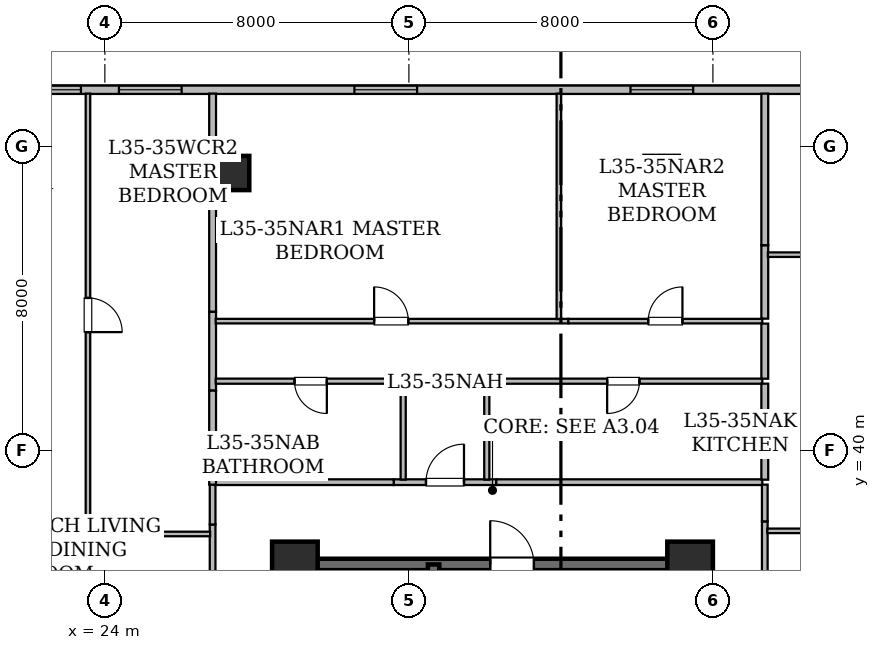
"""IFC4 building model, lengths in metres.
Left out: names, types, materials, properties, quantities, classifications, styles, units other than length and angle.
Written with IfcOpenShell. Run it as: python <this file> out.ifc"""

import sys

from ifc_helpers import new_model, si_unit, direction, frame, frame_2d, origin, origin_2d, place, context, subcontext, project, spatial, rectangle, hollow_rectangle, extrude, element, fill, save


model = new_model("IFC4")
c1 = context("Model", 3, precision=1e-05, world=origin(), true_north=direction((0.0, 1.0)))
c2 = subcontext(c1, "Body", "Model", "MODEL_VIEW")
j1 = project(units=[si_unit("LENGTHUNIT", "METRE"), si_unit("PLANEANGLEUNIT", "RADIAN")], contexts=[c1])
p1 = place(None, origin())
s1 = spatial("IfcSite", under=j1, at=p1, CompositionType="ELEMENT")
p2 = place(p1, origin())
s2 = spatial("IfcBuilding", under=s1, at=p2, CompositionType="ELEMENT")
p3 = place(p2, frame((0.0, 0.0, 138.4)))
s3 = spatial("IfcBuildingStorey", under=s2, at=p3, CompositionType="ELEMENT", Elevation=138.4)
for number, where, z_axis, x_axis in (
    (1, (29.0, 37.0, 0.0), (0.0, 0.0, 1.0), (1.0, 0.0, 0.0)),
    (2, (39.4, 37.0, 0.0), (0.0, 0.0, 1.0), (1.0, 0.0, 0.0)),
):
    element("IfcColumn", number, at=place(p3, frame(where, z_axis=z_axis, x_axis=x_axis)), inside=s3, PredefinedType="COLUMN", context=c2, shape_type="SweptSolid", body=[
        extrude(hollow_rectangle(XDim=1.2, YDim=1.2, WallThickness=0.06, at=origin_2d()), origin(), (0.0, 0.0, 1.0), 3.65),
    ])
for number, where, z_axis, x_axis in (
    (3, (27.35, 47.3, 0.0), (0.0, 0.0, 1.0), (1.0, 0.0, 0.0)),
    (4, (38.65, 47.3, 0.0), (0.0, 0.0, 1.0), (1.0, 0.0, 0.0)),
):
    element("IfcColumn", number, at=place(p3, frame(where, z_axis=z_axis, x_axis=x_axis)), inside=s3, PredefinedType="COLUMN", context=c2, shape_type="SweptSolid", body=[
        extrude(hollow_rectangle(XDim=0.9, YDim=0.9, WallThickness=0.045, at=origin_2d()), origin(), (0.0, 0.0, 1.0), 3.65),
    ])
p4 = place(p3, frame((13.715, 49.49, 0.0), z_axis=(0.0, 0.0, 1.0), x_axis=(1.0, 0.0, 0.0)))
e5 = element("IfcWall", 5, at=p4, inside=s3, PredefinedType="STANDARD", context=c2, shape_type="SweptSolid", body=[
    extrude(rectangle(XDim=38.639, YDim=0.22, at=frame_2d((19.319, 0.0))), origin(), (0.0, 0.0, 1.0), 3.43),
])
p5 = place(p4, frame((2.243, 0.0, 0.85)))
e6 = element("IfcOpeningElement", 6, at=p5, cuts=e5, PredefinedType="OPENING", context=c2, shape_type="SweptSolid", body=[
    extrude(rectangle(XDim=1.65, YDim=1.55, at=frame_2d((0.825, 0.775))), frame((0.0, 0.12, 0.0), z_axis=(0.0, -1.0, 0.0), x_axis=(1.0, 0.0, 0.0)), (0.0, 0.0, 1.0), 0.24),
])
p6 = place(p4, frame((8.455, 0.0, 0.8)))
e7 = element("IfcOpeningElement", 7, at=p6, cuts=e5, PredefinedType="OPENING", context=c2, shape_type="SweptSolid", body=[
    extrude(rectangle(XDim=1.2, YDim=1.5, at=frame_2d((0.6, 0.75))), frame((0.0, 0.12, 0.0), z_axis=(0.0, -1.0, 0.0), x_axis=(1.0, 0.0, 0.0)), (0.0, 0.0, 1.0), 0.24),
])
p7 = place(p4, frame((5.805, 0.0, 0.85)))
e8 = element("IfcOpeningElement", 8, at=p7, cuts=e5, PredefinedType="OPENING", context=c2, shape_type="SweptSolid", body=[
    extrude(rectangle(XDim=1.65, YDim=1.55, at=frame_2d((0.825, 0.775))), frame((0.0, 0.12, 0.0), z_axis=(0.0, -1.0, 0.0), x_axis=(1.0, 0.0, 0.0)), (0.0, 0.0, 1.0), 0.24),
])
p8 = place(p4, frame((10.655, 0.0, 0.85)))
e9 = element("IfcOpeningElement", 9, at=p8, cuts=e5, PredefinedType="OPENING", context=c2, shape_type="SweptSolid", body=[
    extrude(rectangle(XDim=1.65, YDim=1.55, at=frame_2d((0.825, 0.775))), frame((0.0, 0.12, 0.0), z_axis=(0.0, -1.0, 0.0), x_axis=(1.0, 0.0, 0.0)), (0.0, 0.0, 1.0), 0.24),
])
p9 = place(p4, frame((16.851, 0.0, 0.85)))
e10 = element("IfcOpeningElement", 10, at=p9, cuts=e5, PredefinedType="OPENING", context=c2, shape_type="SweptSolid", body=[
    extrude(rectangle(XDim=1.65, YDim=1.55, at=frame_2d((0.825, 0.775))), frame((0.0, 0.12, 0.0), z_axis=(0.0, -1.0, 0.0), x_axis=(1.0, 0.0, 0.0)), (0.0, 0.0, 1.0), 0.24),
])
p10 = place(p4, frame((24.116, 0.0, 0.85)))
e11 = element("IfcOpeningElement", 11, at=p10, cuts=e5, PredefinedType="OPENING", context=c2, shape_type="SweptSolid", body=[
    extrude(rectangle(XDim=1.65, YDim=1.55, at=frame_2d((0.825, 0.775))), frame((0.0, 0.12, 0.0), z_axis=(0.0, -1.0, 0.0), x_axis=(1.0, 0.0, 0.0)), (0.0, 0.0, 1.0), 0.24),
])
p11 = place(p4, frame((30.23, 0.0, 0.85)))
e12 = element("IfcOpeningElement", 12, at=p11, cuts=e5, PredefinedType="OPENING", context=c2, shape_type="SweptSolid", body=[
    extrude(rectangle(XDim=1.65, YDim=1.55, at=frame_2d((0.825, 0.775))), frame((0.0, 0.12, 0.0), z_axis=(0.0, -1.0, 0.0), x_axis=(1.0, 0.0, 0.0)), (0.0, 0.0, 1.0), 0.24),
])
p12 = place(p4, frame((36.367, 0.0, 0.85)))
e13 = element("IfcOpeningElement", 13, at=p12, cuts=e5, PredefinedType="OPENING", context=c2, shape_type="SweptSolid", body=[
    extrude(rectangle(XDim=1.65, YDim=1.55, at=frame_2d((0.825, 0.775))), frame((0.0, 0.12, 0.0), z_axis=(0.0, -1.0, 0.0), x_axis=(1.0, 0.0, 0.0)), (0.0, 0.0, 1.0), 0.24),
])
p13 = place(p3, frame((29.0, 28.0, 0.0), z_axis=(0.0, 0.0, 1.0), x_axis=(0.0, 1.0, 0.0)))
e14 = element("IfcWall", 14, at=p13, inside=s3, PredefinedType="SHEAR", context=c2, shape_type="SweptSolid", body=[
    extrude(rectangle(XDim=9.0, YDim=0.3, at=frame_2d((4.5, 0.0))), origin(), (0.0, 0.0, 1.0), 3.43),
])
p14 = place(p3, frame((29.0, 37.0, 0.0), z_axis=(0.0, 0.0, 1.0), x_axis=(1.0, 0.0, 0.0)))
e15 = element("IfcWall", 15, at=p14, inside=s3, PredefinedType="SHEAR", context=c2, shape_type="SweptSolid", body=[
    extrude(rectangle(XDim=10.4, YDim=0.3, at=frame_2d((5.2, 0.0))), origin(), (0.0, 0.0, 1.0), 3.43),
])
p15 = place(p14, frame((5.14, 0.0, 0.0)))
e16 = element("IfcOpeningElement", 16, at=p15, cuts=e15, PredefinedType="OPENING", context=c2, shape_type="SweptSolid", body=[
    extrude(rectangle(XDim=1.15, YDim=2.2, at=frame_2d((0.575, 1.1))), frame((0.0, 0.16, 0.0), z_axis=(0.0, -1.0, 0.0), x_axis=(1.0, 0.0, 0.0)), (0.0, 0.0, 1.0), 0.32),
])
p16 = place(p3, frame((39.4, 24.4, 0.0), z_axis=(0.0, 0.0, 1.0), x_axis=(0.0, 1.0, 0.0)))
e17 = element("IfcWall", 17, at=p16, inside=s3, PredefinedType="SHEAR", context=c2, shape_type="SweptSolid", body=[
    extrude(rectangle(XDim=12.6, YDim=0.3, at=frame_2d((6.3, 0.0))), origin(), (0.0, 0.0, 1.0), 3.43),
])
p17 = place(p3, frame((32.65, 28.0, 0.0), z_axis=(0.0, 0.0, 1.0), x_axis=(0.0, 1.0, 0.0)))
e18 = element("IfcWall", 18, at=p17, inside=s3, PredefinedType="SHEAR", context=c2, shape_type="SweptSolid", body=[
    extrude(rectangle(XDim=9.0, YDim=0.3, at=frame_2d((4.5, 0.0))), origin(), (0.0, 0.0, 1.0), 3.43),
])
p18 = place(p17, frame((0.72, 0.0, 0.0)))
e19 = element("IfcOpeningElement", 19, at=p18, cuts=e18, PredefinedType="OPENING", context=c2, shape_type="SweptSolid", body=[
    extrude(rectangle(XDim=1.0, YDim=2.15, at=frame_2d((0.5, 1.075))), frame((0.0, 0.16, 0.0), z_axis=(0.0, -1.0, 0.0), x_axis=(1.0, 0.0, 0.0)), (0.0, 0.0, 1.0), 0.32),
])
p19 = place(p3, frame((26.835, 35.973, 0.0), z_axis=(0.0, 0.0, 1.0), x_axis=(0.0, 1.0, 0.0)))
e20 = element("IfcWall", 20, at=p19, inside=s3, PredefinedType="STANDARD", context=c2, shape_type="SweptSolid", body=[
    extrude(rectangle(XDim=2.078, YDim=0.15, at=frame_2d((1.039, 0.0))), origin(), (0.0, 0.0, 1.0), 2.647),
])
p20 = place(p3, frame((26.835, 38.051, 0.0), z_axis=(0.0, 0.0, 1.0), x_axis=(0.0, 1.0, 0.0)))
e21 = element("IfcWall", 21, at=p20, inside=s3, PredefinedType="STANDARD", context=c2, shape_type="SweptSolid", body=[
    extrude(rectangle(XDim=1.049, YDim=0.15, at=frame_2d((0.524, 0.0))), origin(), (0.0, 0.0, 1.0), 3.43),
])
p21 = place(p3, frame((31.601, 39.165, 0.0), z_axis=(0.0, 0.0, 1.0), x_axis=(1.0, 0.0, 0.0)))
e22 = element("IfcWall", 22, at=p21, inside=s3, PredefinedType="STANDARD", context=c2, shape_type="SweptSolid", body=[
    extrude(rectangle(XDim=2.698, YDim=0.15, at=frame_2d((1.349, 0.0))), origin(), (0.0, 0.0, 1.0), 3.43),
])
p22 = place(p21, frame((0.849, 0.0, 0.0)))
e23 = element("IfcOpeningElement", 23, at=p22, cuts=e22, PredefinedType="OPENING", context=c2, shape_type="SweptSolid", body=[
    extrude(rectangle(XDim=1.0, YDim=2.15, at=frame_2d((0.5, 1.075))), frame((0.0, 0.085, 0.0), z_axis=(0.0, -1.0, 0.0), x_axis=(1.0, 0.0, 0.0)), (0.0, 0.0, 1.0), 0.17),
])
p23 = place(p3, frame((26.9, 39.165, 0.0), z_axis=(0.0, 0.0, 1.0), x_axis=(1.0, 0.0, 0.0)))
e24 = element("IfcWall", 24, at=p23, inside=s3, PredefinedType="STANDARD", context=c2, shape_type="SweptSolid", body=[
    extrude(rectangle(XDim=4.701, YDim=0.15, at=frame_2d((2.351, 0.0))), origin(), (0.0, 0.0, 1.0), 2.647),
])
p24 = place(p3, frame((34.299, 39.165, 0.0), z_axis=(0.0, 0.0, 1.0), x_axis=(1.0, 0.0, 0.0)))
e25 = element("IfcWall", 25, at=p24, inside=s3, PredefinedType="STANDARD", context=c2, shape_type="SweptSolid", body=[
    extrude(rectangle(XDim=7.001, YDim=0.15, at=frame_2d((3.5, 0.0))), origin(), (0.0, 0.0, 1.0), 2.647),
])
p25 = place(p3, frame((41.365, 38.133, 0.0), z_axis=(0.0, 0.0, 1.0), x_axis=(0.0, -1.0, 0.0)))
e26 = element("IfcWall", 26, at=p25, inside=s3, PredefinedType="STANDARD", context=c2, shape_type="SweptSolid", body=[
    extrude(rectangle(XDim=2.078, YDim=0.15, at=frame_2d((1.039, 0.0))), origin(), (0.0, 0.0, 1.0), 2.647),
])
p26 = place(p3, frame((41.365, 39.1, 0.0), z_axis=(0.0, 0.0, 1.0), x_axis=(0.0, -1.0, 0.0)))
e27 = element("IfcWall", 27, at=p26, inside=s3, PredefinedType="STANDARD", context=c2, shape_type="SweptSolid", body=[
    extrude(rectangle(XDim=0.967, YDim=0.15, at=frame_2d((0.483, 0.0))), origin(), (0.0, 0.0, 1.0), 3.43),
])
p27 = place(p3, frame((23.555, 49.388, 0.0), z_axis=(0.0, 0.0, 1.0), x_axis=(0.0, -1.0, 0.0)))
e28 = element("IfcWall", 28, at=p27, inside=s3, PredefinedType="PARTITIONING", context=c2, shape_type="SweptSolid", body=[
    extrude(rectangle(XDim=11.651, YDim=0.12, at=frame_2d((5.825, 0.0))), origin(), (0.0, 0.0, 1.0), 2.647),
])
p28 = place(p27, frame((5.375, 0.0, 0.0)))
e29 = element("IfcOpeningElement", 29, at=p28, cuts=e28, PredefinedType="OPENING", context=c2, shape_type="SweptSolid", body=[
    extrude(rectangle(XDim=0.9, YDim=2.1, at=frame_2d((0.45, 1.05))), frame((0.0, 0.07, 0.0), z_axis=(0.0, -1.0, 0.0), x_axis=(1.0, 0.0, 0.0)), (0.0, 0.0, 1.0), 0.14),
])
p29 = place(p3, frame((23.49, 37.802, 0.0), z_axis=(0.0, 0.0, 1.0), x_axis=(1.0, 0.0, 0.0)))
e30 = element("IfcWall", 30, at=p29, inside=s3, PredefinedType="PARTITIONING", context=c2, shape_type="SweptSolid", body=[
    extrude(rectangle(XDim=3.28, YDim=0.12, at=frame_2d((1.64, 0.0))), origin(), (0.0, 0.0, 1.0), 2.647),
])
p30 = place(p3, frame((26.835, 43.651, 0.0), z_axis=(0.0, 0.0, 1.0), x_axis=(0.0, -1.0, 0.0)))
e31 = element("IfcWall", 31, at=p30, inside=s3, PredefinedType="STANDARD", context=c2, shape_type="SweptSolid", body=[
    extrude(rectangle(XDim=2.078, YDim=0.18, at=frame_2d((1.039, 0.0))), origin(), (0.0, 0.0, 1.0), 3.43),
])
p31 = place(p3, frame((26.835, 41.573, 0.0), z_axis=(0.0, 0.0, 1.0), x_axis=(0.0, -1.0, 0.0)))
e32 = element("IfcWall", 32, at=p31, inside=s3, PredefinedType="STANDARD", context=c2, shape_type="SweptSolid", body=[
    extrude(rectangle(XDim=2.473, YDim=0.18, at=frame_2d((1.236, 0.0))), origin(), (0.0, 0.0, 1.0), 3.43),
])
p32 = place(p3, frame((26.835, 49.388, 0.0), z_axis=(0.0, 0.0, 1.0), x_axis=(0.0, -1.0, 0.0)))
e33 = element("IfcWall", 33, at=p32, inside=s3, PredefinedType="STANDARD", context=c2, shape_type="SweptSolid", body=[
    extrude(rectangle(XDim=5.737, YDim=0.18, at=frame_2d((2.869, 0.0))), origin(), (0.0, 0.0, 1.0), 2.876),
])
p33 = place(p3, frame((31.85, 39.232, 0.0), z_axis=(0.0, 0.0, 1.0), x_axis=(0.0, 1.0, 0.0)))
e34 = element("IfcWall", 34, at=p33, inside=s3, PredefinedType="PARTITIONING", context=c2, shape_type="SweptSolid", body=[
    extrude(rectangle(XDim=2.655, YDim=0.135, at=frame_2d((1.328, 0.0))), origin(), (0.0, 0.0, 1.0), 3.43),
])
p34 = place(p3, frame((31.915, 41.822, 0.0), z_axis=(0.0, 0.0, 1.0), x_axis=(-1.0, 0.0, 0.0)))
e35 = element("IfcWall", 35, at=p34, inside=s3, PredefinedType="PARTITIONING", context=c2, shape_type="SweptSolid", body=[
    extrude(rectangle(XDim=4.998, YDim=0.135, at=frame_2d((2.499, 0.0))), origin(), (0.0, 0.0, 1.0), 2.647),
])
p35 = place(p34, frame((2.074, 0.0, 0.0)))
e36 = element("IfcOpeningElement", 36, at=p35, cuts=e35, PredefinedType="OPENING", context=c2, shape_type="SweptSolid", body=[
    extrude(rectangle(XDim=0.85, YDim=2.1, at=frame_2d((0.425, 1.05))), frame((0.0, 0.077, 0.0), z_axis=(0.0, -1.0, 0.0), x_axis=(1.0, 0.0, 0.0)), (0.0, 0.0, 1.0), 0.155),
])
p36 = place(p3, frame((41.3, 41.822, 0.0), z_axis=(0.0, 0.0, 1.0), x_axis=(-1.0, 0.0, 0.0)))
e37 = element("IfcWall", 37, at=p36, inside=s3, PredefinedType="PARTITIONING", context=c2, shape_type="SweptSolid", body=[
    extrude(rectangle(XDim=7.315, YDim=0.135, at=frame_2d((3.657, 0.0))), origin(), (0.0, 0.0, 1.0), 2.647),
])
p37 = place(p36, frame((3.233, 0.0, 0.0)))
e38 = element("IfcOpeningElement", 38, at=p37, cuts=e37, PredefinedType="OPENING", context=c2, shape_type="SweptSolid", body=[
    extrude(rectangle(XDim=0.85, YDim=2.1, at=frame_2d((0.425, 1.05))), frame((0.0, 0.077, 0.0), z_axis=(0.0, -1.0, 0.0), x_axis=(1.0, 0.0, 0.0)), (0.0, 0.0, 1.0), 0.155),
])
p38 = place(p3, frame((34.05, 41.887, 0.0), z_axis=(0.0, 0.0, 1.0), x_axis=(0.0, -1.0, 0.0)))
e39 = element("IfcWall", 39, at=p38, inside=s3, PredefinedType="PARTITIONING", context=c2, shape_type="SweptSolid", body=[
    extrude(rectangle(XDim=2.655, YDim=0.135, at=frame_2d((1.328, 0.0))), origin(), (0.0, 0.0, 1.0), 3.43),
])
p39 = place(p3, frame((26.917, 43.402, 0.0), z_axis=(0.0, 0.0, 1.0), x_axis=(1.0, 0.0, 0.0)))
e40 = element("IfcWall", 40, at=p39, inside=s3, PredefinedType="PARTITIONING", context=c2, shape_type="SweptSolid", body=[
    extrude(rectangle(XDim=9.279, YDim=0.12, at=frame_2d((4.64, 0.0))), origin(), (0.0, 0.0, 1.0), 2.647),
])
p40 = place(p39, frame((4.168, 0.0, 0.0)))
e41 = element("IfcOpeningElement", 41, at=p40, cuts=e40, PredefinedType="OPENING", context=c2, shape_type="SweptSolid", body=[
    extrude(rectangle(XDim=0.9, YDim=2.1, at=frame_2d((0.45, 1.05))), frame((0.0, 0.07, 0.0), z_axis=(0.0, -1.0, 0.0), x_axis=(1.0, 0.0, 0.0)), (0.0, 0.0, 1.0), 0.14),
])
p41 = place(p3, frame((36.196, 43.402, 0.0), z_axis=(0.0, 0.0, 1.0), x_axis=(1.0, 0.0, 0.0)))
e42 = element("IfcWall", 42, at=p41, inside=s3, PredefinedType="PARTITIONING", context=c2, shape_type="SweptSolid", body=[
    extrude(rectangle(XDim=5.104, YDim=0.12, at=frame_2d((2.552, 0.0))), origin(), (0.0, 0.0, 1.0), 2.647),
])
p42 = place(p41, frame((2.102, 0.0, 0.0)))
e43 = element("IfcOpeningElement", 43, at=p42, cuts=e42, PredefinedType="OPENING", context=c2, shape_type="SweptSolid", body=[
    extrude(rectangle(XDim=0.9, YDim=2.1, at=frame_2d((0.45, 1.05))), frame((0.0, 0.07, 0.0), z_axis=(0.0, -1.0, 0.0), x_axis=(1.0, 0.0, 0.0)), (0.0, 0.0, 1.0), 0.14),
])
p43 = place(p3, frame((41.365, 43.337, 0.0), z_axis=(0.0, 0.0, 1.0), x_axis=(0.0, -1.0, 0.0)))
e44 = element("IfcWall", 44, at=p43, inside=s3, PredefinedType="STANDARD", context=c2, shape_type="SweptSolid", body=[
    extrude(rectangle(XDim=1.45, YDim=0.18, at=frame_2d((0.725, 0.0))), origin(), (0.0, 0.0, 1.0), 3.43),
])
p44 = place(p3, frame((41.365, 41.757, 0.0), z_axis=(0.0, 0.0, 1.0), x_axis=(0.0, -1.0, 0.0)))
e45 = element("IfcWall", 45, at=p44, inside=s3, PredefinedType="STANDARD", context=c2, shape_type="SweptSolid", body=[
    extrude(rectangle(XDim=2.527, YDim=0.18, at=frame_2d((1.264, 0.0))), origin(), (0.0, 0.0, 1.0), 3.43),
])
p45 = place(p3, frame((35.947, 49.388, 0.0), z_axis=(0.0, 0.0, 1.0), x_axis=(0.0, -1.0, 0.0)))
e46 = element("IfcWall", 46, at=p45, inside=s3, PredefinedType="PARTITIONING", context=c2, shape_type="SweptSolid", body=[
    extrude(rectangle(XDim=5.932, YDim=0.12, at=frame_2d((2.966, 0.0))), origin(), (0.0, 0.0, 1.0), 2.876),
])
p46 = place(p3, frame((41.365, 45.4, 0.0), z_axis=(0.0, 0.0, 1.0), x_axis=(0.0, -1.0, 0.0)))
e47 = element("IfcWall", 47, at=p46, inside=s3, PredefinedType="STANDARD", context=c2, shape_type="SweptSolid", body=[
    extrude(rectangle(XDim=1.933, YDim=0.18, at=frame_2d((0.966, 0.0))), origin(), (0.0, 0.0, 1.0), 3.43),
])
p47 = place(p3, frame((41.365, 49.388, 0.0), z_axis=(0.0, 0.0, 1.0), x_axis=(0.0, -1.0, 0.0)))
e48 = element("IfcWall", 48, at=p47, inside=s3, PredefinedType="STANDARD", context=c2, shape_type="SweptSolid", body=[
    extrude(rectangle(XDim=3.988, YDim=0.18, at=frame_2d((1.994, 0.0))), origin(), (0.0, 0.0, 1.0), 2.876),
])
p48 = place(p3, frame((41.432, 37.884, 0.0), z_axis=(0.0, 0.0, 1.0), x_axis=(1.0, 0.0, 0.0)))
e49 = element("IfcWall", 49, at=p48, inside=s3, PredefinedType="PARTITIONING", context=c2, shape_type="SweptSolid", body=[
    extrude(rectangle(XDim=6.808, YDim=0.12, at=frame_2d((3.404, 0.0))), origin(), (0.0, 0.0, 1.0), 2.647),
])
p49 = place(p3, frame((41.447, 45.151, 0.0), z_axis=(0.0, 0.0, 1.0), x_axis=(1.0, 0.0, 0.0)))
e50 = element("IfcWall", 50, at=p49, inside=s3, PredefinedType="PARTITIONING", context=c2, shape_type="SweptSolid", body=[
    extrude(rectangle(XDim=6.674, YDim=0.12, at=frame_2d((3.337, 0.0))), origin(), (0.0, 0.0, 1.0), 3.43),
])
p50 = place(p6, origin())
e51 = element("IfcWindow", 51, at=p50, inside=s3, PartitioningType="SINGLE_PANEL", PredefinedType="WINDOW", context=c2, shape_type="SweptSolid", body=[
    extrude(rectangle(XDim=1.2, YDim=1.5, at=frame_2d((0.6, 0.75))), frame((0.0, 0.03, 0.0), z_axis=(0.0, -1.0, 0.0), x_axis=(1.0, 0.0, 0.0)), (0.0, 0.0, 1.0), 0.06),
])
fill(e7, e51)
p51 = place(p8, origin())
e52 = element("IfcWindow", 52, at=p51, inside=s3, PartitioningType="SINGLE_PANEL", PredefinedType="WINDOW", context=c2, shape_type="SweptSolid", body=[
    extrude(rectangle(XDim=1.65, YDim=1.55, at=frame_2d((0.825, 0.775))), frame((0.0, 0.03, 0.0), z_axis=(0.0, -1.0, 0.0), x_axis=(1.0, 0.0, 0.0)), (0.0, 0.0, 1.0), 0.06),
])
fill(e9, e52)
p52 = place(p9, origin())
e53 = element("IfcWindow", 53, at=p52, inside=s3, PartitioningType="SINGLE_PANEL", PredefinedType="WINDOW", context=c2, shape_type="SweptSolid", body=[
    extrude(rectangle(XDim=1.65, YDim=1.55, at=frame_2d((0.825, 0.775))), frame((0.0, 0.03, 0.0), z_axis=(0.0, -1.0, 0.0), x_axis=(1.0, 0.0, 0.0)), (0.0, 0.0, 1.0), 0.06),
])
fill(e10, e53)
p53 = place(p10, origin())
e54 = element("IfcWindow", 54, at=p53, inside=s3, PartitioningType="SINGLE_PANEL", PredefinedType="WINDOW", context=c2, shape_type="SweptSolid", body=[
    extrude(rectangle(XDim=1.65, YDim=1.55, at=frame_2d((0.825, 0.775))), frame((0.0, 0.03, 0.0), z_axis=(0.0, -1.0, 0.0), x_axis=(1.0, 0.0, 0.0)), (0.0, 0.0, 1.0), 0.06),
])
fill(e11, e54)
p54 = place(p15, origin())
e55 = element("IfcDoor", 55, at=p54, inside=s3, OperationType="SINGLE_SWING_LEFT", PredefinedType="DOOR", context=c2, shape_type="SweptSolid", body=[
    extrude(rectangle(XDim=1.15, YDim=2.2, at=frame_2d((0.575, 1.1))), frame((0.0, 0.025, 0.0), z_axis=(0.0, -1.0, 0.0), x_axis=(1.0, 0.0, 0.0)), (0.0, 0.0, 1.0), 0.05),
])
fill(e16, e55)
p55 = place(p22, origin())
e56 = element("IfcDoor", 56, at=p55, inside=s3, OperationType="SINGLE_SWING_RIGHT", PredefinedType="DOOR", context=c2, shape_type="SweptSolid", body=[
    extrude(rectangle(XDim=1.0, YDim=2.15, at=frame_2d((0.5, 1.075))), frame((0.0, 0.025, 0.0), z_axis=(0.0, -1.0, 0.0), x_axis=(1.0, 0.0, 0.0)), (0.0, 0.0, 1.0), 0.05),
])
fill(e23, e56)
p56 = place(p28, origin())
e57 = element("IfcDoor", 57, at=p56, inside=s3, OperationType="SINGLE_SWING_RIGHT", PredefinedType="DOOR", context=c2, shape_type="SweptSolid", body=[
    extrude(rectangle(XDim=0.9, YDim=2.1, at=frame_2d((0.45, 1.05))), frame((0.0, 0.025, 0.0), z_axis=(0.0, -1.0, 0.0), x_axis=(1.0, 0.0, 0.0)), (0.0, 0.0, 1.0), 0.05),
])
fill(e29, e57)
p57 = place(p35, origin())
e58 = element("IfcDoor", 58, at=p57, inside=s3, OperationType="SINGLE_SWING_LEFT", PredefinedType="DOOR", context=c2, shape_type="SweptSolid", body=[
    extrude(rectangle(XDim=0.85, YDim=2.1, at=frame_2d((0.425, 1.05))), frame((0.0, 0.025, 0.0), z_axis=(0.0, -1.0, 0.0), x_axis=(1.0, 0.0, 0.0)), (0.0, 0.0, 1.0), 0.05),
])
fill(e36, e58)
p58 = place(p37, origin())
e59 = element("IfcDoor", 59, at=p58, inside=s3, OperationType="SINGLE_SWING_RIGHT", PredefinedType="DOOR", context=c2, shape_type="SweptSolid", body=[
    extrude(rectangle(XDim=0.85, YDim=2.1, at=frame_2d((0.425, 1.05))), frame((0.0, 0.025, 0.0), z_axis=(0.0, -1.0, 0.0), x_axis=(1.0, 0.0, 0.0)), (0.0, 0.0, 1.0), 0.05),
])
fill(e38, e59)
p59 = place(p40, origin())
e60 = element("IfcDoor", 60, at=p59, inside=s3, OperationType="SINGLE_SWING_LEFT", PredefinedType="DOOR", context=c2, shape_type="SweptSolid", body=[
    extrude(rectangle(XDim=0.9, YDim=2.1, at=frame_2d((0.45, 1.05))), frame((0.0, 0.025, 0.0), z_axis=(0.0, -1.0, 0.0), x_axis=(1.0, 0.0, 0.0)), (0.0, 0.0, 1.0), 0.05),
])
fill(e41, e60)
p60 = place(p42, origin())
e61 = element("IfcDoor", 61, at=p60, inside=s3, OperationType="SINGLE_SWING_RIGHT", PredefinedType="DOOR", context=c2, shape_type="SweptSolid", body=[
    extrude(rectangle(XDim=0.9, YDim=2.1, at=frame_2d((0.45, 1.05))), frame((0.0, 0.025, 0.0), z_axis=(0.0, -1.0, 0.0), x_axis=(1.0, 0.0, 0.0)), (0.0, 0.0, 1.0), 0.05),
])
fill(e43, e61)
save(model, sys.argv[1])
